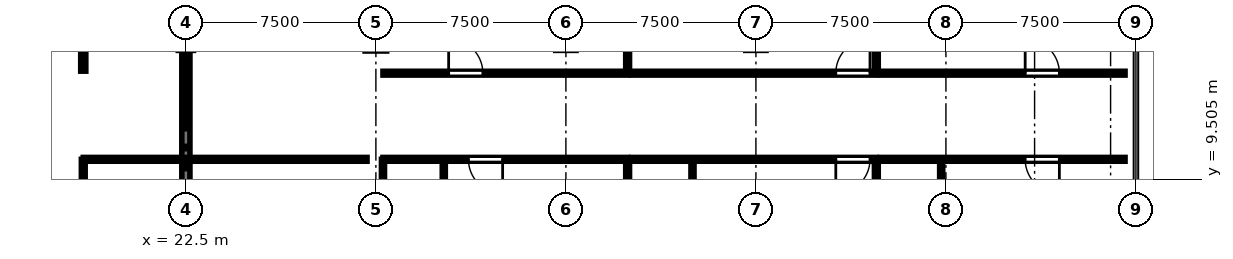
"""IFC4 building model, lengths in metres.
Left out: names, types, materials, properties, quantities, classifications, styles, units other than length and angle.
Written with IfcOpenShell. Run it as: python <this file> out.ifc"""

import sys

from ifc_helpers import new_model, si_unit, direction, frame, frame_2d, origin, place, context, subcontext, project, spatial, rectangle, extrude, element, fill, save


model = new_model("IFC4")
c1 = context("Model", 3, precision=1e-05, world=origin(), true_north=direction((0.0, 1.0)))
c2 = subcontext(c1, "Body", "Model", "MODEL_VIEW")
j1 = project(units=[si_unit("LENGTHUNIT", "METRE"), si_unit("PLANEANGLEUNIT", "RADIAN")], contexts=[c1])
p1 = place(None, origin())
s1 = spatial("IfcSite", under=j1, at=p1, CompositionType="ELEMENT")
p2 = place(p1, origin())
s2 = spatial("IfcBuilding", under=s1, at=p2, CompositionType="ELEMENT")
p3 = place(p2, frame((0.0, 0.0, 4.8)))
s3 = spatial("IfcBuildingStorey", under=s2, at=p3, CompositionType="ELEMENT", Elevation=4.8)
p4 = place(p3, frame((22.5, 7.95, 0.0), z_axis=(0.0, 0.0, 1.0), x_axis=(0.0, 1.0, 0.0)))
e1 = element("IfcWall", 1, at=p4, inside=s3, PredefinedType="SHEAR", context=c2, shape_type="SweptSolid", body=[
    extrude(rectangle(XDim=6.6, YDim=0.32, at=frame_2d((3.3, 0.0))), origin(), (0.0, 0.0, 1.0), 3.63),
])
p5 = place(p3, frame((18.45, 10.3, 0.0), z_axis=(0.0, 0.0, 1.0), x_axis=(0.0, -1.0, 0.0)))
e2 = element("IfcWall", 2, at=p5, inside=s3, PredefinedType="PARTITIONING", context=c2, shape_type="SweptSolid", body=[
    extrude(rectangle(XDim=9.95, YDim=0.15, at=frame_2d((4.975, 0.0))), origin(), (0.0, 0.0, 1.0), 3.765),
])
p6 = place(p5, frame((5.92, 0.0, 0.0)))
e3 = element("IfcOpeningElement", 3, at=p6, cuts=e2, PredefinedType="OPENING", context=c2, shape_type="SweptSolid", body=[
    extrude(rectangle(XDim=1.35, YDim=2.25, at=frame_2d((0.675, 1.125))), frame((0.0, 0.085, 0.0), z_axis=(0.0, -1.0, 0.0), x_axis=(1.0, 0.0, 0.0)), (0.0, 0.0, 1.0), 0.17),
])
p7 = place(p3, frame((18.45, 22.392, 0.0), z_axis=(0.0, 0.0, 1.0), x_axis=(0.0, -1.0, 0.0)))
e4 = element("IfcWall", 4, at=p7, inside=s3, PredefinedType="STANDARD", context=c2, shape_type="SweptSolid", body=[
    extrude(rectangle(XDim=8.612, YDim=0.2, at=frame_2d((4.306, 0.0))), origin(), (0.0, 0.0, 1.0), 3.765),
])
p8 = place(p7, frame((3.035, 0.0, 0.0)))
e5 = element("IfcOpeningElement", 5, at=p8, cuts=e4, PredefinedType="OPENING", context=c2, shape_type="SweptSolid", body=[
    extrude(rectangle(XDim=1.15, YDim=2.2, at=frame_2d((0.575, 1.1))), frame((0.0, 0.11, 0.0), z_axis=(0.0, -1.0, 0.0), x_axis=(1.0, 0.0, 0.0)), (0.0, 0.0, 1.0), 0.22),
])
p9 = place(p3, frame((39.937, 10.3, 0.0), z_axis=(0.0, 0.0, 1.0), x_axis=(-1.0, 0.0, 0.0)))
e6 = element("IfcWall", 6, at=p9, inside=s3, PredefinedType="PARTITIONING", context=c2, shape_type="SweptSolid", body=[
    extrude(rectangle(XDim=9.657, YDim=0.15, at=frame_2d((4.828, 0.0))), origin(), (0.0, 0.0, 1.0), 4.165),
])
p10 = place(p9, frame((4.934, 0.0, 0.0)))
e7 = element("IfcOpeningElement", 7, at=p10, cuts=e6, PredefinedType="OPENING", context=c2, shape_type="SweptSolid", body=[
    extrude(rectangle(XDim=1.35, YDim=2.25, at=frame_2d((0.675, 1.125))), frame((0.0, 0.085, 0.0), z_axis=(0.0, -1.0, 0.0), x_axis=(1.0, 0.0, 0.0)), (0.0, 0.0, 1.0), 0.17),
])
p11 = place(p3, frame((32.68, 8.3, 0.0), z_axis=(0.0, 0.0, 1.0), x_axis=(0.0, 1.0, 0.0)))
e8 = element("IfcWall", 8, at=p11, inside=s3, PredefinedType="PARTITIONING", context=c2, shape_type="SweptSolid", body=[
    extrude(rectangle(XDim=2.0, YDim=0.12, at=frame_2d((1.0, 0.0))), origin(), (0.0, 0.0, 1.0), 4.165),
])
p12 = place(p3, frame((30.28, 13.7, 0.0), z_axis=(0.0, 0.0, 1.0), x_axis=(1.0, 0.0, 0.0)))
e9 = element("IfcWall", 9, at=p12, inside=s3, PredefinedType="PARTITIONING", context=c2, shape_type="SweptSolid", body=[
    extrude(rectangle(XDim=9.657, YDim=0.15, at=frame_2d((4.828, 0.0))), origin(), (0.0, 0.0, 1.0), 4.165),
])
p13 = place(p12, frame((2.592, 0.0, 0.0)))
e10 = element("IfcOpeningElement", 10, at=p13, cuts=e9, PredefinedType="OPENING", context=c2, shape_type="SweptSolid", body=[
    extrude(rectangle(XDim=1.35, YDim=2.25, at=frame_2d((0.675, 1.125))), frame((0.0, 0.085, 0.0), z_axis=(0.0, -1.0, 0.0), x_axis=(1.0, 0.0, 0.0)), (0.0, 0.0, 1.0), 0.17),
])
p14 = place(p3, frame((49.753, 10.3, 0.0), z_axis=(0.0, 0.0, 1.0), x_axis=(-1.0, 0.0, 0.0)))
e11 = element("IfcWall", 11, at=p14, inside=s3, PredefinedType="PARTITIONING", context=c2, shape_type="SweptSolid", body=[
    extrude(rectangle(XDim=9.657, YDim=0.15, at=frame_2d((4.828, 0.0))), origin(), (0.0, 0.0, 1.0), 4.165),
])
p15 = place(p14, frame((0.25, 0.0, 0.0)))
e12 = element("IfcOpeningElement", 12, at=p15, cuts=e11, PredefinedType="OPENING", context=c2, shape_type="SweptSolid", body=[
    extrude(rectangle(XDim=1.35, YDim=2.25, at=frame_2d((0.675, 1.125))), frame((0.0, 0.085, 0.0), z_axis=(0.0, -1.0, 0.0), x_axis=(1.0, 0.0, 0.0)), (0.0, 0.0, 1.0), 0.17),
])
p16 = place(p3, frame((42.497, 8.3, 0.0), z_axis=(0.0, 0.0, 1.0), x_axis=(0.0, 1.0, 0.0)))
e13 = element("IfcWall", 13, at=p16, inside=s3, PredefinedType="PARTITIONING", context=c2, shape_type="SweptSolid", body=[
    extrude(rectangle(XDim=2.0, YDim=0.12, at=frame_2d((1.0, 0.0))), origin(), (0.0, 0.0, 1.0), 4.165),
])
p17 = place(p3, frame((40.097, 13.7, 0.0), z_axis=(0.0, 0.0, 1.0), x_axis=(1.0, 0.0, 0.0)))
e14 = element("IfcWall", 14, at=p17, inside=s3, PredefinedType="PARTITIONING", context=c2, shape_type="SweptSolid", body=[
    extrude(rectangle(XDim=9.657, YDim=0.15, at=frame_2d((4.828, 0.0))), origin(), (0.0, 0.0, 1.0), 4.165),
])
p18 = place(p17, frame((8.057, 0.0, 0.0)))
e15 = element("IfcOpeningElement", 15, at=p18, cuts=e14, PredefinedType="OPENING", context=c2, shape_type="SweptSolid", body=[
    extrude(rectangle(XDim=1.35, YDim=2.25, at=frame_2d((0.675, 1.125))), frame((0.0, 0.085, 0.0), z_axis=(0.0, -1.0, 0.0), x_axis=(1.0, 0.0, 0.0)), (0.0, 0.0, 1.0), 0.17),
])
p19 = place(p3, frame((59.57, 10.3, 0.0), z_axis=(0.0, 0.0, 1.0), x_axis=(-1.0, 0.0, 0.0)))
e16 = element("IfcWall", 16, at=p19, inside=s3, PredefinedType="PARTITIONING", context=c2, shape_type="SweptSolid", body=[
    extrude(rectangle(XDim=9.657, YDim=0.15, at=frame_2d((4.828, 0.0))), origin(), (0.0, 0.0, 1.0), 4.165),
])
p20 = place(p19, frame((2.592, 0.0, 0.0)))
e17 = element("IfcOpeningElement", 17, at=p20, cuts=e16, PredefinedType="OPENING", context=c2, shape_type="SweptSolid", body=[
    extrude(rectangle(XDim=1.35, YDim=2.25, at=frame_2d((0.675, 1.125))), frame((0.0, 0.085, 0.0), z_axis=(0.0, -1.0, 0.0), x_axis=(1.0, 0.0, 0.0)), (0.0, 0.0, 1.0), 0.17),
])
p21 = place(p3, frame((52.313, 8.3, 0.0), z_axis=(0.0, 0.0, 1.0), x_axis=(0.0, 1.0, 0.0)))
e18 = element("IfcWall", 18, at=p21, inside=s3, PredefinedType="PARTITIONING", context=c2, shape_type="SweptSolid", body=[
    extrude(rectangle(XDim=2.0, YDim=0.12, at=frame_2d((1.0, 0.0))), origin(), (0.0, 0.0, 1.0), 3.565),
])
p22 = place(p3, frame((49.913, 13.7, 0.0), z_axis=(0.0, 0.0, 1.0), x_axis=(1.0, 0.0, 0.0)))
e19 = element("IfcWall", 19, at=p22, inside=s3, PredefinedType="PARTITIONING", context=c2, shape_type="SweptSolid", body=[
    extrude(rectangle(XDim=9.657, YDim=0.15, at=frame_2d((4.828, 0.0))), origin(), (0.0, 0.0, 1.0), 4.165),
])
p23 = place(p22, frame((5.715, 0.0, 0.0)))
e20 = element("IfcOpeningElement", 20, at=p23, cuts=e19, PredefinedType="OPENING", context=c2, shape_type="SweptSolid", body=[
    extrude(rectangle(XDim=1.35, YDim=2.25, at=frame_2d((0.675, 1.125))), frame((0.0, 0.085, 0.0), z_axis=(0.0, -1.0, 0.0), x_axis=(1.0, 0.0, 0.0)), (0.0, 0.0, 1.0), 0.17),
])
p24 = place(p3, frame((18.45, 10.3, 0.0), z_axis=(0.0, 0.0, 1.0), x_axis=(1.0, 0.0, 0.0)))
e21 = element("IfcWall", 21, at=p24, inside=s3, PredefinedType="PARTITIONING", context=c2, shape_type="SweptSolid", body=[
    extrude(rectangle(XDim=11.2, YDim=0.15, at=frame_2d((5.6, 0.0))), origin(), (0.0, 0.0, 1.0), 4.165),
])
p25 = place(p3, frame((39.937, 0.35, 0.0), z_axis=(0.0, 0.0, 1.0), x_axis=(0.0, 1.0, 0.0)))
e22 = element("IfcWall", 22, at=p25, inside=s3, PredefinedType="PARTITIONING", context=c2, shape_type="SweptSolid", body=[
    extrude(rectangle(XDim=9.95, YDim=0.15, at=frame_2d((4.975, 0.0))), origin(), (0.0, 0.0, 1.0), 4.165),
])
p26 = place(p3, frame((39.937, 13.7, 0.0), z_axis=(0.0, 0.0, 1.0), x_axis=(0.0, 1.0, 0.0)))
e23 = element("IfcWall", 23, at=p26, inside=s3, PredefinedType="PARTITIONING", context=c2, shape_type="SweptSolid", body=[
    extrude(rectangle(XDim=8.45, YDim=0.15, at=frame_2d((4.225, 0.0))), origin(), (0.0, 0.0, 1.0), 4.165),
])
p27 = place(p3, frame((49.753, 0.35, 0.0), z_axis=(0.0, 0.0, 1.0), x_axis=(0.0, 1.0, 0.0)))
e24 = element("IfcWall", 24, at=p27, inside=s3, PredefinedType="PARTITIONING", context=c2, shape_type="SweptSolid", body=[
    extrude(rectangle(XDim=9.95, YDim=0.15, at=frame_2d((4.975, 0.0))), origin(), (0.0, 0.0, 1.0), 4.165),
])
p28 = place(p3, frame((49.753, 13.7, 0.0), z_axis=(0.0, 0.0, 1.0), x_axis=(0.0, 1.0, 0.0)))
e25 = element("IfcWall", 25, at=p28, inside=s3, PredefinedType="PARTITIONING", context=c2, shape_type="SweptSolid", body=[
    extrude(rectangle(XDim=8.45, YDim=0.15, at=frame_2d((4.225, 0.0))), origin(), (0.0, 0.0, 1.0), 4.165),
])
p29 = place(p3, frame((30.28, 8.3, 0.0), z_axis=(0.0, 0.0, 1.0), x_axis=(0.0, 1.0, 0.0)))
e26 = element("IfcWall", 26, at=p29, inside=s3, PredefinedType="PARTITIONING", context=c2, shape_type="SweptSolid", body=[
    extrude(rectangle(XDim=2.0, YDim=0.12, at=frame_2d((1.0, 0.0))), origin(), (0.0, 0.0, 1.0), 3.565),
])
p30 = place(p10, origin())
e27 = element("IfcDoor", 27, at=p30, inside=s3, OperationType="SINGLE_SWING_LEFT", PredefinedType="DOOR", context=c2, shape_type="SweptSolid", body=[
    extrude(rectangle(XDim=1.35, YDim=2.25, at=frame_2d((0.675, 1.125))), frame((0.0, 0.025, 0.0), z_axis=(0.0, -1.0, 0.0), x_axis=(1.0, 0.0, 0.0)), (0.0, 0.0, 1.0), 0.05),
])
fill(e7, e27)
p31 = place(p13, origin())
e28 = element("IfcDoor", 28, at=p31, inside=s3, OperationType="SINGLE_SWING_LEFT", PredefinedType="DOOR", context=c2, shape_type="SweptSolid", body=[
    extrude(rectangle(XDim=1.35, YDim=2.25, at=frame_2d((0.675, 1.125))), frame((0.0, 0.025, 0.0), z_axis=(0.0, -1.0, 0.0), x_axis=(1.0, 0.0, 0.0)), (0.0, 0.0, 1.0), 0.05),
])
fill(e10, e28)
p32 = place(p15, origin())
e29 = element("IfcDoor", 29, at=p32, inside=s3, OperationType="SINGLE_SWING_RIGHT", PredefinedType="DOOR", context=c2, shape_type="SweptSolid", body=[
    extrude(rectangle(XDim=1.35, YDim=2.25, at=frame_2d((0.675, 1.125))), frame((0.0, 0.025, 0.0), z_axis=(0.0, -1.0, 0.0), x_axis=(1.0, 0.0, 0.0)), (0.0, 0.0, 1.0), 0.05),
])
fill(e12, e29)
p33 = place(p18, origin())
e30 = element("IfcDoor", 30, at=p33, inside=s3, OperationType="SINGLE_SWING_RIGHT", PredefinedType="DOOR", context=c2, shape_type="SweptSolid", body=[
    extrude(rectangle(XDim=1.35, YDim=2.25, at=frame_2d((0.675, 1.125))), frame((0.0, 0.025, 0.0), z_axis=(0.0, -1.0, 0.0), x_axis=(1.0, 0.0, 0.0)), (0.0, 0.0, 1.0), 0.05),
])
fill(e15, e30)
p34 = place(p20, origin())
e31 = element("IfcDoor", 31, at=p34, inside=s3, OperationType="SINGLE_SWING_LEFT", PredefinedType="DOOR", context=c2, shape_type="SweptSolid", body=[
    extrude(rectangle(XDim=1.35, YDim=2.25, at=frame_2d((0.675, 1.125))), frame((0.0, 0.025, 0.0), z_axis=(0.0, -1.0, 0.0), x_axis=(1.0, 0.0, 0.0)), (0.0, 0.0, 1.0), 0.05),
])
fill(e17, e31)
p35 = place(p23, origin())
e32 = element("IfcDoor", 32, at=p35, inside=s3, OperationType="SINGLE_SWING_LEFT", PredefinedType="DOOR", context=c2, shape_type="SweptSolid", body=[
    extrude(rectangle(XDim=1.35, YDim=2.25, at=frame_2d((0.675, 1.125))), frame((0.0, 0.025, 0.0), z_axis=(0.0, -1.0, 0.0), x_axis=(1.0, 0.0, 0.0)), (0.0, 0.0, 1.0), 0.05),
])
fill(e20, e32)
save(model, sys.argv[1])
